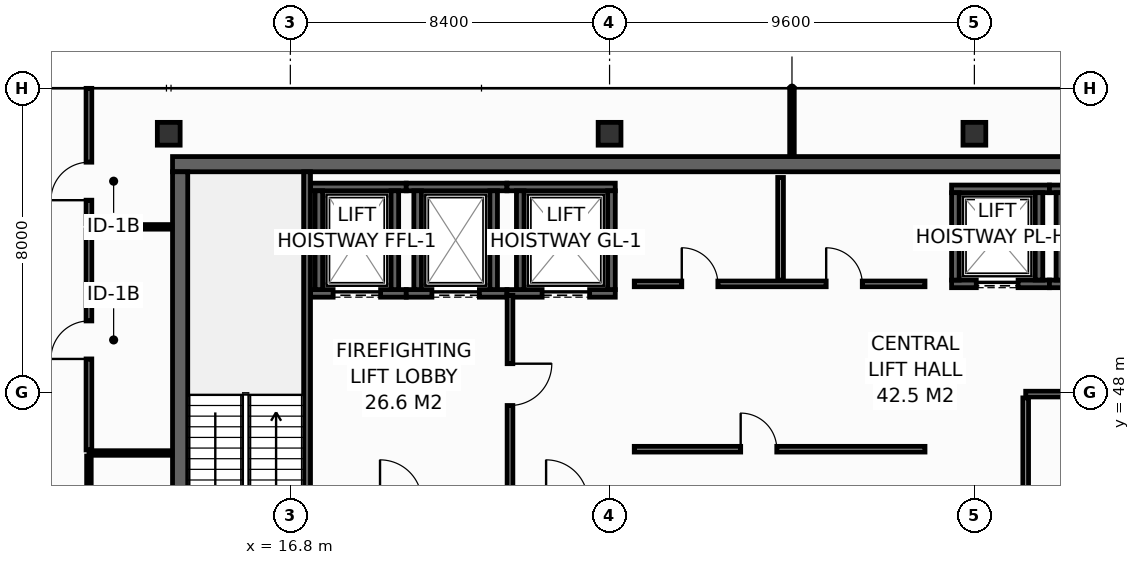
"""IFC4 building model, lengths in metres.
Left out: names, types, materials, properties, quantities, classifications, styles, units other than length and angle.
Written with IfcOpenShell. Run it as: python <this file> out.ifc"""

import sys

from ifc_helpers import new_model, si_unit, direction, frame, frame_2d, origin, origin_2d, place, context, subcontext, project, spatial, rectangle, hollow_rectangle, extrude, element, fill, save


model = new_model("IFC4")
c1 = context("Model", 3, precision=1e-05, world=origin(), true_north=direction((0.0, 1.0)))
c2 = subcontext(c1, "Body", "Model", "MODEL_VIEW")
j1 = project(units=[si_unit("LENGTHUNIT", "METRE"), si_unit("PLANEANGLEUNIT", "RADIAN")], contexts=[c1])
p1 = place(None, origin())
s1 = spatial("IfcSite", under=j1, at=p1, CompositionType="ELEMENT")
p2 = place(p1, origin())
s2 = spatial("IfcBuilding", under=s1, at=p2, CompositionType="ELEMENT")
p3 = place(p2, frame((0.0, 0.0, 319.2)))
s3 = spatial("IfcBuildingStorey", under=s2, at=p3, CompositionType="ELEMENT", Elevation=319.2)
p4 = place(p3, frame((13.7, 54.0, 0.0), z_axis=(0.0, 0.0, 1.0), x_axis=(1.0, 0.0, 0.0)))
e1 = element("IfcWall", 1, at=p4, inside=s3, PredefinedType="SHEAR", context=c2, shape_type="SweptSolid", body=[
    extrude(rectangle(XDim=32.5, YDim=0.4, at=frame_2d((16.25, 0.0))), origin(), (0.0, 0.0, 1.0), 3.95),
])
p5 = place(p3, frame((13.9, 43.4, 0.0), z_axis=(0.0, 0.0, 1.0), x_axis=(0.0, 1.0, 0.0)))
e2 = element("IfcWall", 2, at=p5, inside=s3, PredefinedType="SHEAR", context=c2, shape_type="SweptSolid", body=[
    extrude(rectangle(XDim=10.4, YDim=0.4, at=frame_2d((5.2, 0.0))), origin(), (0.0, 0.0, 1.0), 3.95),
])
for number, where, z_axis, x_axis in (
    (3, (13.6, 54.8, 0.0), (0.0, 0.0, 1.0), (1.0, 0.0, 0.0)),
    (4, (25.2, 54.8, 0.0), (0.0, 0.0, 1.0), (1.0, 0.0, 0.0)),
    (5, (34.8, 54.8, 0.0), (0.0, 0.0, 1.0), (1.0, 0.0, 0.0)),
):
    element("IfcColumn", number, at=place(p3, frame(where, z_axis=z_axis, x_axis=x_axis)), inside=s3, PredefinedType="COLUMN", context=c2, shape_type="SweptSolid", body=[
        extrude(hollow_rectangle(XDim=0.6, YDim=0.6, WallThickness=0.028, at=origin_2d()), origin(), (0.0, 0.0, 1.0), 4.2),
    ])
p6 = place(p3, frame((17.33, 50.6, 0.0), z_axis=(0.0, 0.0, 1.0), x_axis=(1.0, 0.0, 0.0)))
e6 = element("IfcWall", 6, at=p6, inside=s3, PredefinedType="SHEAR", context=c2, shape_type="SweptSolid", body=[
    extrude(rectangle(XDim=2.52, YDim=0.2, at=frame_2d((1.26, 0.0))), origin(), (0.0, 0.0, 1.0), 3.95),
])
p7 = place(p6, frame((0.595, 0.0, 0.0)))
e7 = element("IfcOpeningElement", 7, at=p7, cuts=e6, PredefinedType="OPENING", context=c2, shape_type="SweptSolid", body=[
    extrude(rectangle(XDim=1.25, YDim=2.3, at=frame_2d((0.625, 1.15))), frame((0.0, 0.11, 0.0), z_axis=(0.0, -1.0, 0.0), x_axis=(1.0, 0.0, 0.0)), (0.0, 0.0, 1.0), 0.22),
])
p8 = place(p3, frame((17.33, 53.4, 0.0), z_axis=(0.0, 0.0, 1.0), x_axis=(1.0, 0.0, 0.0)))
e8 = element("IfcWall", 8, at=p8, inside=s3, PredefinedType="SHEAR", context=c2, shape_type="SweptSolid", body=[
    extrude(rectangle(XDim=2.52, YDim=0.2, at=frame_2d((1.26, 0.0))), origin(), (0.0, 0.0, 1.0), 3.95),
])
for number, where, z_axis, x_axis in (
    (9, (17.55, 50.7, 0.0), (0.0, 0.0, 1.0), (0.0, 1.0, 0.0)),
    (10, (19.55, 50.7, 0.0), (0.0, 0.0, 1.0), (0.0, 1.0, 0.0)),
):
    element("IfcWall", number, at=place(p3, frame(where, z_axis=z_axis, x_axis=x_axis)), inside=s3, PredefinedType="SHEAR", context=c2, shape_type="SweptSolid", body=[
        extrude(rectangle(XDim=2.6, YDim=0.2, at=frame_2d((1.3, 0.0))), origin(), (0.0, 0.0, 1.0), 3.95),
    ])
p9 = place(p3, frame((19.85, 50.6, 0.0), z_axis=(0.0, 0.0, 1.0), x_axis=(1.0, 0.0, 0.0)))
e11 = element("IfcWall", 11, at=p9, inside=s3, PredefinedType="SHEAR", context=c2, shape_type="SweptSolid", body=[
    extrude(rectangle(XDim=2.65, YDim=0.2, at=frame_2d((1.325, 0.0))), origin(), (0.0, 0.0, 1.0), 3.95),
])
p10 = place(p9, frame((0.675, 0.0, 0.0)))
e12 = element("IfcOpeningElement", 12, at=p10, cuts=e11, PredefinedType="OPENING", context=c2, shape_type="SweptSolid", body=[
    extrude(rectangle(XDim=1.25, YDim=2.3, at=frame_2d((0.625, 1.15))), frame((0.0, 0.11, 0.0), z_axis=(0.0, -1.0, 0.0), x_axis=(1.0, 0.0, 0.0)), (0.0, 0.0, 1.0), 0.22),
])
p11 = place(p3, frame((19.85, 53.4, 0.0), z_axis=(0.0, 0.0, 1.0), x_axis=(1.0, 0.0, 0.0)))
e13 = element("IfcWall", 13, at=p11, inside=s3, PredefinedType="SHEAR", context=c2, shape_type="SweptSolid", body=[
    extrude(rectangle(XDim=2.65, YDim=0.2, at=frame_2d((1.325, 0.0))), origin(), (0.0, 0.0, 1.0), 3.95),
])
for number, where, z_axis, x_axis in (
    (14, (20.15, 50.7, 0.0), (0.0, 0.0, 1.0), (0.0, 1.0, 0.0)),
    (15, (22.15, 50.7, 0.0), (0.0, 0.0, 1.0), (0.0, 1.0, 0.0)),
):
    element("IfcWall", number, at=place(p3, frame(where, z_axis=z_axis, x_axis=x_axis)), inside=s3, PredefinedType="SHEAR", context=c2, shape_type="SweptSolid", body=[
        extrude(rectangle(XDim=2.6, YDim=0.2, at=frame_2d((1.3, 0.0))), origin(), (0.0, 0.0, 1.0), 3.95),
    ])
p12 = place(p3, frame((22.5, 50.6, 0.0), z_axis=(0.0, 0.0, 1.0), x_axis=(1.0, 0.0, 0.0)))
e16 = element("IfcWall", 16, at=p12, inside=s3, PredefinedType="SHEAR", context=c2, shape_type="SweptSolid", body=[
    extrude(rectangle(XDim=2.85, YDim=0.2, at=frame_2d((1.425, 0.0))), origin(), (0.0, 0.0, 1.0), 3.95),
])
p13 = place(p12, frame((0.925, 0.0, 0.0)))
e17 = element("IfcOpeningElement", 17, at=p13, cuts=e16, PredefinedType="OPENING", context=c2, shape_type="SweptSolid", body=[
    extrude(rectangle(XDim=1.25, YDim=2.3, at=frame_2d((0.625, 1.15))), frame((0.0, 0.11, 0.0), z_axis=(0.0, -1.0, 0.0), x_axis=(1.0, 0.0, 0.0)), (0.0, 0.0, 1.0), 0.22),
])
p14 = place(p3, frame((22.5, 53.4, 0.0), z_axis=(0.0, 0.0, 1.0), x_axis=(1.0, 0.0, 0.0)))
e18 = element("IfcWall", 18, at=p14, inside=s3, PredefinedType="SHEAR", context=c2, shape_type="SweptSolid", body=[
    extrude(rectangle(XDim=2.85, YDim=0.2, at=frame_2d((1.425, 0.0))), origin(), (0.0, 0.0, 1.0), 3.95),
])
for number, where, z_axis, x_axis in (
    (19, (22.85, 50.7, 0.0), (0.0, 0.0, 1.0), (0.0, 1.0, 0.0)),
    (20, (25.25, 50.7, 0.0), (0.0, 0.0, 1.0), (0.0, 1.0, 0.0)),
):
    element("IfcWall", number, at=place(p3, frame(where, z_axis=z_axis, x_axis=x_axis)), inside=s3, PredefinedType="SHEAR", context=c2, shape_type="SweptSolid", body=[
        extrude(rectangle(XDim=2.6, YDim=0.2, at=frame_2d((1.3, 0.0))), origin(), (0.0, 0.0, 1.0), 3.95),
    ])
p15 = place(p3, frame((34.2, 50.85, 0.0), z_axis=(0.0, 0.0, 1.0), x_axis=(1.0, 0.0, 0.0)))
e21 = element("IfcWall", 21, at=p15, inside=s3, PredefinedType="SHEAR", context=c2, shape_type="SweptSolid", body=[
    extrude(rectangle(XDim=2.575, YDim=0.2, at=frame_2d((1.288, 0.0))), origin(), (0.0, 0.0, 1.0), 3.95),
])
p16 = place(p15, frame((0.65, 0.0, 0.0)))
e22 = element("IfcOpeningElement", 22, at=p16, cuts=e21, PredefinedType="OPENING", context=c2, shape_type="SweptSolid", body=[
    extrude(rectangle(XDim=1.1, YDim=2.2, at=frame_2d((0.55, 1.1))), frame((0.0, 0.11, 0.0), z_axis=(0.0, -1.0, 0.0), x_axis=(1.0, 0.0, 0.0)), (0.0, 0.0, 1.0), 0.22),
])
p17 = place(p3, frame((34.2, 53.35, 0.0), z_axis=(0.0, 0.0, 1.0), x_axis=(1.0, 0.0, 0.0)))
e23 = element("IfcWall", 23, at=p17, inside=s3, PredefinedType="SHEAR", context=c2, shape_type="SweptSolid", body=[
    extrude(rectangle(XDim=2.575, YDim=0.2, at=frame_2d((1.288, 0.0))), origin(), (0.0, 0.0, 1.0), 3.95),
])
for number, where, z_axis, x_axis in (
    (24, (34.3, 50.95, 0.0), (0.0, 0.0, 1.0), (0.0, 1.0, 0.0)),
    (25, (36.5, 50.95, 0.0), (0.0, 0.0, 1.0), (0.0, 1.0, 0.0)),
):
    element("IfcWall", number, at=place(p3, frame(where, z_axis=z_axis, x_axis=x_axis)), inside=s3, PredefinedType="SHEAR", context=c2, shape_type="SweptSolid", body=[
        extrude(rectangle(XDim=2.3, YDim=0.2, at=frame_2d((1.15, 0.0))), origin(), (0.0, 0.0, 1.0), 3.95),
    ])
p18 = place(p3, frame((36.775, 50.85, 0.0), z_axis=(0.0, 0.0, 1.0), x_axis=(1.0, 0.0, 0.0)))
e26 = element("IfcWall", 26, at=p18, inside=s3, PredefinedType="SHEAR", context=c2, shape_type="SweptSolid", body=[
    extrude(rectangle(XDim=2.75, YDim=0.2, at=frame_2d((1.375, 0.0))), origin(), (0.0, 0.0, 1.0), 3.95),
])
p19 = place(p18, frame((0.825, 0.0, 0.0)))
e27 = element("IfcOpeningElement", 27, at=p19, cuts=e26, PredefinedType="OPENING", context=c2, shape_type="SweptSolid", body=[
    extrude(rectangle(XDim=1.1, YDim=2.2, at=frame_2d((0.55, 1.1))), frame((0.0, 0.11, 0.0), z_axis=(0.0, -1.0, 0.0), x_axis=(1.0, 0.0, 0.0)), (0.0, 0.0, 1.0), 0.22),
])
p20 = place(p3, frame((36.775, 53.35, 0.0), z_axis=(0.0, 0.0, 1.0), x_axis=(1.0, 0.0, 0.0)))
e28 = element("IfcWall", 28, at=p20, inside=s3, PredefinedType="SHEAR", context=c2, shape_type="SweptSolid", body=[
    extrude(rectangle(XDim=2.75, YDim=0.2, at=frame_2d((1.375, 0.0))), origin(), (0.0, 0.0, 1.0), 3.95),
])
p21 = place(p3, frame((37.05, 50.95, 0.0), z_axis=(0.0, 0.0, 1.0), x_axis=(0.0, 1.0, 0.0)))
e29 = element("IfcWall", 29, at=p21, inside=s3, PredefinedType="SHEAR", context=c2, shape_type="SweptSolid", body=[
    extrude(rectangle(XDim=2.3, YDim=0.2, at=frame_2d((1.15, 0.0))), origin(), (0.0, 0.0, 1.0), 3.95),
])
p22 = place(p3, frame((17.24, 43.4, 0.0), z_axis=(0.0, 0.0, 1.0), x_axis=(0.0, 1.0, 0.0)))
e30 = element("IfcWall", 30, at=p22, inside=s3, PredefinedType="SHEAR", context=c2, shape_type="SweptSolid", body=[
    extrude(rectangle(XDim=10.4, YDim=0.18, at=frame_2d((5.2, 0.0))), origin(), (0.0, 0.0, 1.0), 3.95),
])
p23 = place(p22, frame((0.16, 0.0, 0.0)))
e31 = element("IfcOpeningElement", 31, at=p23, cuts=e30, PredefinedType="OPENING", context=c2, shape_type="SweptSolid", body=[
    extrude(rectangle(XDim=1.0, YDim=2.15, at=frame_2d((0.5, 1.075))), frame((0.0, 0.1, 0.0), z_axis=(0.0, -1.0, 0.0), x_axis=(1.0, 0.0, 0.0)), (0.0, 0.0, 1.0), 0.2),
])
p24 = place(p3, frame((22.58, 50.55, 0.0), z_axis=(0.0, 0.0, 1.0), x_axis=(0.0, -1.0, 0.0)))
e32 = element("IfcWall", 32, at=p24, inside=s3, PredefinedType="PARTITIONING", context=c2, shape_type="SweptSolid", body=[
    extrude(rectangle(XDim=5.33, YDim=0.15, at=frame_2d((2.665, 0.0))), origin(), (0.0, 0.0, 1.0), 3.95),
])
p25 = place(p24, frame((1.8, 0.0, 0.0)))
e33 = element("IfcOpeningElement", 33, at=p25, cuts=e32, PredefinedType="OPENING", context=c2, shape_type="SweptSolid", body=[
    extrude(rectangle(XDim=1.1, YDim=2.15, at=frame_2d((0.55, 1.075))), frame((0.0, 0.085, 0.0), z_axis=(0.0, -1.0, 0.0), x_axis=(1.0, 0.0, 0.0)), (0.0, 0.0, 1.0), 0.17),
])
p26 = place(p3, frame((36.15, 47.95, 0.0), z_axis=(0.0, 0.0, 1.0), x_axis=(1.0, 0.0, 0.0)))
e34 = element("IfcWall", 34, at=p26, inside=s3, PredefinedType="PARTITIONING", context=c2, shape_type="SweptSolid", body=[
    extrude(rectangle(XDim=6.35, YDim=0.15, at=frame_2d((3.175, 0.0))), origin(), (0.0, 0.0, 1.0), 3.95),
])
p27 = place(p3, frame((36.15, 45.22, 0.0), z_axis=(0.0, 0.0, 1.0), x_axis=(0.0, 1.0, 0.0)))
e35 = element("IfcWall", 35, at=p27, inside=s3, PredefinedType="PARTITIONING", context=c2, shape_type="SweptSolid", body=[
    extrude(rectangle(XDim=2.63, YDim=0.15, at=frame_2d((1.315, 0.0))), origin(), (0.0, 0.0, 1.0), 3.95),
])
p28 = place(p3, frame((25.85, 50.85, 0.0), z_axis=(0.0, 0.0, 1.0), x_axis=(1.0, 0.0, 0.0)))
e36 = element("IfcWall", 36, at=p28, inside=s3, PredefinedType="PARTITIONING", context=c2, shape_type="SweptSolid", body=[
    extrude(rectangle(XDim=7.65, YDim=0.15, at=frame_2d((3.825, 0.0))), origin(), (0.0, 0.0, 1.0), 3.95),
])
p29 = place(p28, frame((1.25, 0.0, 0.0)))
e37 = element("IfcOpeningElement", 37, at=p29, cuts=e36, PredefinedType="OPENING", context=c2, shape_type="SweptSolid", body=[
    extrude(rectangle(XDim=0.95, YDim=2.15, at=frame_2d((0.475, 1.075))), frame((0.0, 0.085, 0.0), z_axis=(0.0, -1.0, 0.0), x_axis=(1.0, 0.0, 0.0)), (0.0, 0.0, 1.0), 0.17),
])
p30 = place(p28, frame((5.05, 0.0, 0.0)))
e38 = element("IfcOpeningElement", 38, at=p30, cuts=e36, PredefinedType="OPENING", context=c2, shape_type="SweptSolid", body=[
    extrude(rectangle(XDim=0.95, YDim=2.15, at=frame_2d((0.475, 1.075))), frame((0.0, 0.085, 0.0), z_axis=(0.0, -1.0, 0.0), x_axis=(1.0, 0.0, 0.0)), (0.0, 0.0, 1.0), 0.17),
])
p31 = place(p3, frame((29.7, 50.95, 0.0), z_axis=(0.0, 0.0, 1.0), x_axis=(0.0, 1.0, 0.0)))
e39 = element("IfcWall", 39, at=p31, inside=s3, PredefinedType="PARTITIONING", context=c2, shape_type="SweptSolid", body=[
    extrude(rectangle(XDim=2.7, YDim=0.15, at=frame_2d((1.35, 0.0))), origin(), (0.0, 0.0, 1.0), 3.95),
])
p32 = place(p3, frame((25.85, 46.5, 0.0), z_axis=(0.0, 0.0, 1.0), x_axis=(1.0, 0.0, 0.0)))
e40 = element("IfcWall", 40, at=p32, inside=s3, PredefinedType="PARTITIONING", context=c2, shape_type="SweptSolid", body=[
    extrude(rectangle(XDim=7.65, YDim=0.15, at=frame_2d((3.825, 0.0))), origin(), (0.0, 0.0, 1.0), 3.95),
])
p33 = place(p32, frame((2.8, 0.0, 0.0)))
e41 = element("IfcOpeningElement", 41, at=p33, cuts=e40, PredefinedType="OPENING", context=c2, shape_type="SweptSolid", body=[
    extrude(rectangle(XDim=0.95, YDim=2.15, at=frame_2d((0.475, 1.075))), frame((0.0, 0.085, 0.0), z_axis=(0.0, -1.0, 0.0), x_axis=(1.0, 0.0, 0.0)), (0.0, 0.0, 1.0), 0.17),
])
p34 = place(p3, frame((11.5, 52.35, 0.0), z_axis=(0.0, 0.0, 1.0), x_axis=(1.0, 0.0, 0.0)))
e42 = element("IfcWall", 42, at=p34, inside=s3, PredefinedType="PARTITIONING", context=c2, shape_type="SweptSolid", body=[
    extrude(rectangle(XDim=2.18, YDim=0.12, at=frame_2d((1.09, 0.0))), origin(), (0.0, 0.0, 1.0), 3.95),
])
p35 = place(p3, frame((30.0, 54.22, 0.0), z_axis=(0.0, 0.0, 1.0), x_axis=(0.0, 1.0, 0.0)))
e43 = element("IfcWall", 43, at=p35, inside=s3, PredefinedType="PARTITIONING", context=c2, shape_type="SweptSolid", body=[
    extrude(rectangle(XDim=1.775, YDim=0.12, at=frame_2d((0.888, 0.0))), origin(), (0.0, 0.0, 1.0), 3.335),
])
p36 = place(p3, frame((11.5, 52.43, 0.0), z_axis=(0.0, 0.0, 1.0), x_axis=(0.0, 1.0, 0.0)))
e44 = element("IfcWall", 44, at=p36, inside=s3, PredefinedType="PARTITIONING", context=c2, shape_type="SweptSolid", body=[
    extrude(rectangle(XDim=3.565, YDim=0.15, at=frame_2d((1.783, 0.0))), origin(), (0.0, 0.0, 1.0), 3.335),
])
p37 = place(p36, frame((0.622, 0.0, 0.0)))
e45 = element("IfcOpeningElement", 45, at=p37, cuts=e44, PredefinedType="OPENING", context=c2, shape_type="SweptSolid", body=[
    extrude(rectangle(XDim=1.0, YDim=2.15, at=frame_2d((0.5, 1.075))), frame((0.0, 0.085, 0.0), z_axis=(0.0, -1.0, 0.0), x_axis=(1.0, 0.0, 0.0)), (0.0, 0.0, 1.0), 0.17),
])
p38 = place(p3, frame((11.5, 46.4, 0.0), z_axis=(0.0, 0.0, 1.0), x_axis=(1.0, 0.0, 0.0)))
e46 = element("IfcWall", 46, at=p38, inside=s3, PredefinedType="PARTITIONING", context=c2, shape_type="SweptSolid", body=[
    extrude(rectangle(XDim=2.18, YDim=0.12, at=frame_2d((1.09, 0.0))), origin(), (0.0, 0.0, 1.0), 3.95),
])
p39 = place(p3, frame((11.5, 42.02, 0.0), z_axis=(0.0, 0.0, 1.0), x_axis=(0.0, 1.0, 0.0)))
e47 = element("IfcWall", 47, at=p39, inside=s3, PredefinedType="PARTITIONING", context=c2, shape_type="SweptSolid", body=[
    extrude(rectangle(XDim=4.3, YDim=0.12, at=frame_2d((2.15, 0.0))), origin(), (0.0, 0.0, 1.0), 3.347),
])
p40 = place(p39, frame((1.7, 0.0, 0.0)))
e48 = element("IfcOpeningElement", 48, at=p40, cuts=e47, PredefinedType="OPENING", context=c2, shape_type="SweptSolid", body=[
    extrude(rectangle(XDim=0.9, YDim=2.1, at=frame_2d((0.45, 1.05))), frame((0.0, 0.07, 0.0), z_axis=(0.0, -1.0, 0.0), x_axis=(1.0, 0.0, 0.0)), (0.0, 0.0, 1.0), 0.14),
])
p41 = place(p3, frame((11.5, 46.48, 0.0), z_axis=(0.0, 0.0, 1.0), x_axis=(0.0, 1.0, 0.0)))
e49 = element("IfcWall", 49, at=p41, inside=s3, PredefinedType="PARTITIONING", context=c2, shape_type="SweptSolid", body=[
    extrude(rectangle(XDim=5.79, YDim=0.15, at=frame_2d((2.895, 0.0))), origin(), (0.0, 0.0, 1.0), 3.95),
])
p42 = place(p41, frame((2.395, 0.0, 0.0)))
e50 = element("IfcOpeningElement", 50, at=p42, cuts=e49, PredefinedType="OPENING", context=c2, shape_type="SweptSolid", body=[
    extrude(rectangle(XDim=1.0, YDim=2.15, at=frame_2d((0.5, 1.075))), frame((0.0, 0.085, 0.0), z_axis=(0.0, -1.0, 0.0), x_axis=(1.0, 0.0, 0.0)), (0.0, 0.0, 1.0), 0.17),
])
p43 = place(p7, origin())
e51 = element("IfcDoor", 51, at=p43, inside=s3, OperationType="SLIDING_TO_LEFT", PredefinedType="DOOR", context=c2, shape_type="SweptSolid", body=[
    extrude(rectangle(XDim=1.25, YDim=2.3, at=frame_2d((0.625, 1.15))), frame((0.0, 0.025, 0.0), z_axis=(0.0, -1.0, 0.0), x_axis=(1.0, 0.0, 0.0)), (0.0, 0.0, 1.0), 0.05),
])
fill(e7, e51)
p44 = place(p10, origin())
e52 = element("IfcDoor", 52, at=p44, inside=s3, OperationType="SLIDING_TO_LEFT", PredefinedType="DOOR", context=c2, shape_type="SweptSolid", body=[
    extrude(rectangle(XDim=1.25, YDim=2.3, at=frame_2d((0.625, 1.15))), frame((0.0, 0.025, 0.0), z_axis=(0.0, -1.0, 0.0), x_axis=(1.0, 0.0, 0.0)), (0.0, 0.0, 1.0), 0.05),
])
fill(e12, e52)
p45 = place(p13, origin())
e53 = element("IfcDoor", 53, at=p45, inside=s3, OperationType="SLIDING_TO_LEFT", PredefinedType="DOOR", context=c2, shape_type="SweptSolid", body=[
    extrude(rectangle(XDim=1.25, YDim=2.3, at=frame_2d((0.625, 1.15))), frame((0.0, 0.025, 0.0), z_axis=(0.0, -1.0, 0.0), x_axis=(1.0, 0.0, 0.0)), (0.0, 0.0, 1.0), 0.05),
])
fill(e17, e53)
p46 = place(p16, origin())
e54 = element("IfcDoor", 54, at=p46, inside=s3, OperationType="SLIDING_TO_LEFT", PredefinedType="DOOR", context=c2, shape_type="SweptSolid", body=[
    extrude(rectangle(XDim=1.1, YDim=2.2, at=frame_2d((0.55, 1.1))), frame((0.0, 0.025, 0.0), z_axis=(0.0, -1.0, 0.0), x_axis=(1.0, 0.0, 0.0)), (0.0, 0.0, 1.0), 0.05),
])
fill(e22, e54)
p47 = place(p25, origin())
e55 = element("IfcDoor", 55, at=p47, inside=s3, OperationType="SINGLE_SWING_LEFT", PredefinedType="DOOR", context=c2, shape_type="SweptSolid", body=[
    extrude(rectangle(XDim=1.1, YDim=2.15, at=frame_2d((0.55, 1.075))), frame((0.0, 0.025, 0.0), z_axis=(0.0, -1.0, 0.0), x_axis=(1.0, 0.0, 0.0)), (0.0, 0.0, 1.0), 0.05),
])
fill(e33, e55)
p48 = place(p29, origin())
e56 = element("IfcDoor", 56, at=p48, inside=s3, OperationType="SINGLE_SWING_LEFT", PredefinedType="DOOR", context=c2, shape_type="SweptSolid", body=[
    extrude(rectangle(XDim=0.95, YDim=2.15, at=frame_2d((0.475, 1.075))), frame((0.0, 0.025, 0.0), z_axis=(0.0, -1.0, 0.0), x_axis=(1.0, 0.0, 0.0)), (0.0, 0.0, 1.0), 0.05),
])
fill(e37, e56)
p49 = place(p30, origin())
e57 = element("IfcDoor", 57, at=p49, inside=s3, OperationType="SINGLE_SWING_LEFT", PredefinedType="DOOR", context=c2, shape_type="SweptSolid", body=[
    extrude(rectangle(XDim=0.95, YDim=2.15, at=frame_2d((0.475, 1.075))), frame((0.0, 0.025, 0.0), z_axis=(0.0, -1.0, 0.0), x_axis=(1.0, 0.0, 0.0)), (0.0, 0.0, 1.0), 0.05),
])
fill(e38, e57)
p50 = place(p33, origin())
e58 = element("IfcDoor", 58, at=p50, inside=s3, OperationType="SINGLE_SWING_LEFT", PredefinedType="DOOR", context=c2, shape_type="SweptSolid", body=[
    extrude(rectangle(XDim=0.95, YDim=2.15, at=frame_2d((0.475, 1.075))), frame((0.0, 0.025, 0.0), z_axis=(0.0, -1.0, 0.0), x_axis=(1.0, 0.0, 0.0)), (0.0, 0.0, 1.0), 0.05),
])
fill(e41, e58)
p51 = place(p37, origin())
e59 = element("IfcDoor", 59, at=p51, inside=s3, OperationType="SINGLE_SWING_LEFT", PredefinedType="DOOR", context=c2, shape_type="SweptSolid", body=[
    extrude(rectangle(XDim=1.0, YDim=2.15, at=frame_2d((0.5, 1.075))), frame((0.0, 0.025, 0.0), z_axis=(0.0, -1.0, 0.0), x_axis=(1.0, 0.0, 0.0)), (0.0, 0.0, 1.0), 0.05),
])
fill(e45, e59)
p52 = place(p42, origin())
e60 = element("IfcDoor", 60, at=p52, inside=s3, OperationType="SINGLE_SWING_LEFT", PredefinedType="DOOR", context=c2, shape_type="SweptSolid", body=[
    extrude(rectangle(XDim=1.0, YDim=2.15, at=frame_2d((0.5, 1.075))), frame((0.0, 0.025, 0.0), z_axis=(0.0, -1.0, 0.0), x_axis=(1.0, 0.0, 0.0)), (0.0, 0.0, 1.0), 0.05),
])
fill(e50, e60)
save(model, sys.argv[1])
